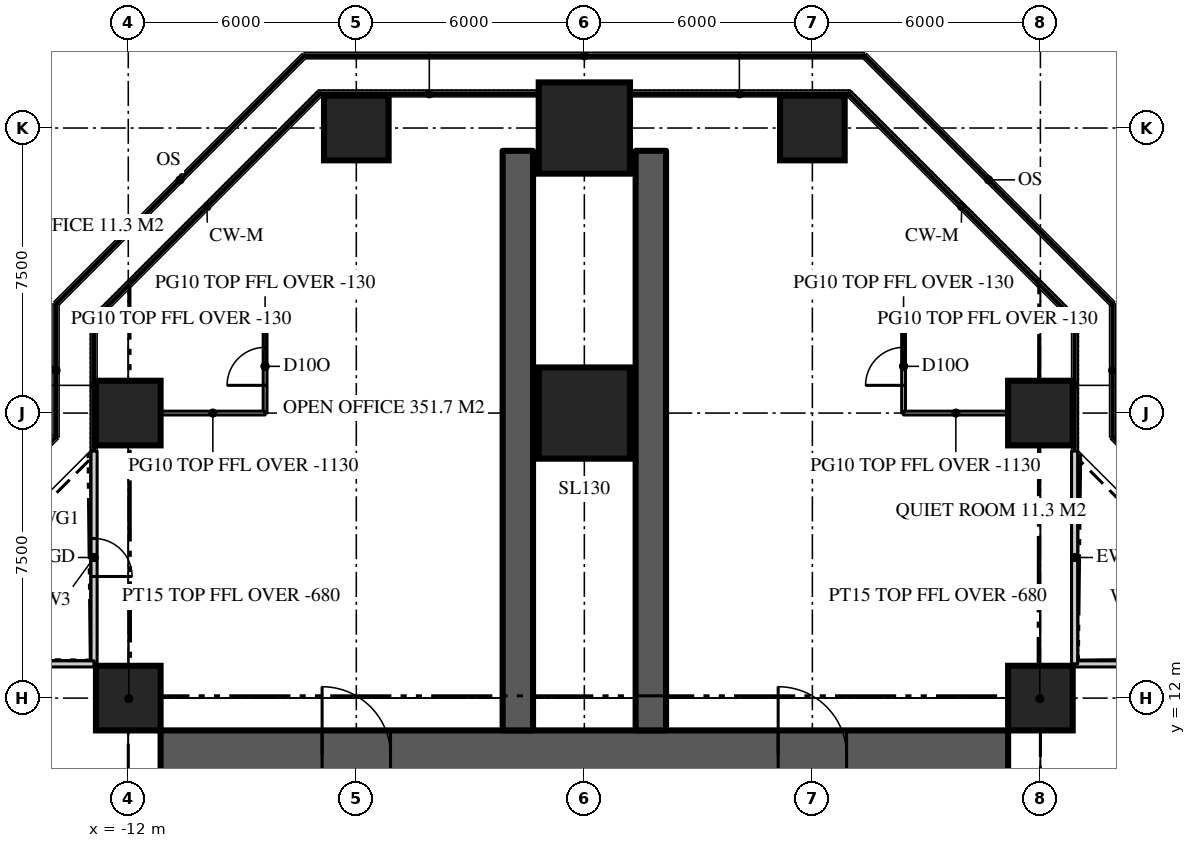
"""IFC4 building model, lengths in metres.
Left out: names, types, materials, properties, quantities, classifications, styles, units other than length and angle.
Written with IfcOpenShell. Run it as: python <this file> out.ifc"""

import sys

from ifc_helpers import new_model, si_unit, direction, frame, frame_2d, origin, origin_2d, place, context, subcontext, project, spatial, rectangle, extrude, element, fill, save


model = new_model("IFC4")
c1 = context("Model", 3, precision=1e-05, world=origin(), true_north=direction((0.0, 1.0)))
c2 = subcontext(c1, "Body", "Model", "MODEL_VIEW")
j1 = project(units=[si_unit("LENGTHUNIT", "METRE"), si_unit("PLANEANGLEUNIT", "RADIAN")], contexts=[c1])
p1 = place(None, origin())
s1 = spatial("IfcSite", under=j1, at=p1, CompositionType="ELEMENT")
p2 = place(p1, origin())
s2 = spatial("IfcBuilding", under=s1, at=p2, CompositionType="ELEMENT")
p3 = place(p2, frame((0.0, 0.0, 178.8)))
s3 = spatial("IfcBuildingStorey", under=s2, at=p3, CompositionType="ELEMENT", Elevation=178.8)
p4 = place(p3, frame((-11.15, 10.5, 0.0), z_axis=(0.0, 0.0, 1.0), x_axis=(1.0, 0.0, 0.0)))
e1 = element("IfcWall", 1, at=p4, inside=s3, PredefinedType="SHEAR", context=c2, shape_type="SweptSolid", body=[
    extrude(rectangle(XDim=22.3, YDim=1.3, at=frame_2d((11.15, 0.0))), origin(), (0.0, 0.0, 1.0), 3.9),
])
p5 = place(p4, frame((4.25, 0.0, 0.0)))
e2 = element("IfcOpeningElement", 2, at=p5, cuts=e1, PredefinedType="OPENING", context=c2, shape_type="SweptSolid", body=[
    extrude(rectangle(XDim=1.8, YDim=2.2, at=frame_2d((0.9, 1.1))), frame((0.0, 0.66, 0.0), z_axis=(0.0, -1.0, 0.0), x_axis=(1.0, 0.0, 0.0)), (0.0, 0.0, 1.0), 1.32),
])
p6 = place(p4, frame((16.25, 0.0, 0.0)))
e3 = element("IfcOpeningElement", 3, at=p6, cuts=e1, PredefinedType="OPENING", context=c2, shape_type="SweptSolid", body=[
    extrude(rectangle(XDim=1.8, YDim=2.2, at=frame_2d((0.9, 1.1))), frame((0.0, 0.66, 0.0), z_axis=(0.0, -1.0, 0.0), x_axis=(1.0, 0.0, 0.0)), (0.0, 0.0, 1.0), 1.32),
])
for number, where, z_axis, x_axis in (
    (4, (1.75, 11.15, 0.0), (0.0, 0.0, 1.0), (0.0, 1.0, 0.0)),
    (5, (-1.75, 11.15, 0.0), (0.0, 0.0, 1.0), (0.0, 1.0, 0.0)),
):
    element("IfcWall", number, at=place(p3, frame(where, z_axis=z_axis, x_axis=x_axis)), inside=s3, PredefinedType="SHEAR", context=c2, shape_type="SweptSolid", body=[
        extrude(rectangle(XDim=15.25, YDim=0.8, at=frame_2d((7.625, 0.0))), origin(), (0.0, 0.0, 1.0), 3.9),
    ])
for number, where, z_axis, x_axis in (
    (6, (-12.0, 12.0, 0.0), (0.0, 0.0, 1.0), (1.0, 0.0, 0.0)),
    (7, (12.0, 12.0, 0.0), (0.0, 0.0, 1.0), (1.0, 0.0, 0.0)),
    (8, (-12.0, 19.5, 0.0), (0.0, 0.0, 1.0), (1.0, 0.0, 0.0)),
):
    element("IfcColumn", number, at=place(p3, frame(where, z_axis=z_axis, x_axis=x_axis)), inside=s3, PredefinedType="COLUMN", context=c2, shape_type="SweptSolid", body=[
        extrude(rectangle(XDim=1.7, YDim=1.7, at=origin_2d()), origin(), (0.0, 0.0, 1.0), 3.9),
    ])
p7 = place(p3, frame((0.0, 19.5, 0.0), z_axis=(0.0, 0.0, 1.0), x_axis=(1.0, 0.0, 0.0)))
e9 = element("IfcColumn", 9, at=p7, inside=s3, PredefinedType="COLUMN", context=c2, shape_type="SweptSolid", body=[
    extrude(rectangle(XDim=2.4, YDim=2.4, at=origin_2d()), origin(), (0.0, 0.0, 1.0), 3.9),
])
for number, where, z_axis, x_axis in (
    (10, (12.0, 19.5, 0.0), (0.0, 0.0, 1.0), (1.0, 0.0, 0.0)),
    (11, (-6.0, 27.0, 0.0), (0.0, 0.0, 1.0), (1.0, 0.0, 0.0)),
):
    element("IfcColumn", number, at=place(p3, frame(where, z_axis=z_axis, x_axis=x_axis)), inside=s3, PredefinedType="COLUMN", context=c2, shape_type="SweptSolid", body=[
        extrude(rectangle(XDim=1.7, YDim=1.7, at=origin_2d()), origin(), (0.0, 0.0, 1.0), 3.9),
    ])
p8 = place(p3, frame((0.0, 27.0, 0.0), z_axis=(0.0, 0.0, 1.0), x_axis=(1.0, 0.0, 0.0)))
e12 = element("IfcColumn", 12, at=p8, inside=s3, PredefinedType="COLUMN", context=c2, shape_type="SweptSolid", body=[
    extrude(rectangle(XDim=2.4, YDim=2.4, at=origin_2d()), origin(), (0.0, 0.0, 1.0), 3.9),
])
p9 = place(p3, frame((6.0, 27.0, 0.0), z_axis=(0.0, 0.0, 1.0), x_axis=(1.0, 0.0, 0.0)))
e13 = element("IfcColumn", 13, at=p9, inside=s3, PredefinedType="COLUMN", context=c2, shape_type="SweptSolid", body=[
    extrude(rectangle(XDim=1.7, YDim=1.7, at=origin_2d()), origin(), (0.0, 0.0, 1.0), 3.9),
])
p10 = place(p3, frame((18.5, 12.9, 0.0), z_axis=(0.0, 0.0, 1.0), x_axis=(-1.0, 0.0, 0.0)))
e14 = element("IfcWall", 14, at=p10, inside=s3, PredefinedType="SOLIDWALL", context=c2, shape_type="SweptSolid", body=[
    extrude(rectangle(XDim=5.6, YDim=0.16, at=frame_2d((2.8, 0.0))), origin(), (0.0, 0.0, 1.0), 3.77),
])
p11 = place(p10, frame((2.3, 0.0, 0.0)))
e15 = element("IfcOpeningElement", 15, at=p11, cuts=e14, PredefinedType="OPENING", context=c2, shape_type="SweptSolid", body=[
    extrude(rectangle(XDim=1.0, YDim=2.2, at=frame_2d((0.5, 1.1))), frame((0.0, 0.09, 0.0), z_axis=(0.0, -1.0, 0.0), x_axis=(1.0, 0.0, 0.0)), (0.0, 0.0, 1.0), 0.18),
])
p12 = place(p3, frame((12.9, 12.9, 0.0), z_axis=(0.0, 0.0, 1.0), x_axis=(0.0, 1.0, 0.0)))
e16 = element("IfcWall", 16, at=p12, inside=s3, PredefinedType="SOLIDWALL", context=c2, shape_type="SweptSolid", body=[
    extrude(rectangle(XDim=5.6, YDim=0.16, at=frame_2d((2.8, 0.0))), origin(), (0.0, 0.0, 1.0), 3.77),
])
p13 = place(p3, frame((-12.9, 18.5, 0.0), z_axis=(0.0, 0.0, 1.0), x_axis=(0.0, -1.0, 0.0)))
e17 = element("IfcWall", 17, at=p13, inside=s3, PredefinedType="SOLIDWALL", context=c2, shape_type="SweptSolid", body=[
    extrude(rectangle(XDim=5.6, YDim=0.16, at=frame_2d((2.8, 0.0))), origin(), (0.0, 0.0, 1.0), 3.77),
])
p14 = place(p13, frame((2.3, 0.0, 0.0)))
e18 = element("IfcOpeningElement", 18, at=p14, cuts=e17, PredefinedType="OPENING", context=c2, shape_type="SweptSolid", body=[
    extrude(rectangle(XDim=1.0, YDim=2.2, at=frame_2d((0.5, 1.1))), frame((0.0, 0.09, 0.0), z_axis=(0.0, -1.0, 0.0), x_axis=(1.0, 0.0, 0.0)), (0.0, 0.0, 1.0), 0.18),
])
p15 = place(p3, frame((-12.9, 12.9, 0.0), z_axis=(0.0, 0.0, 1.0), x_axis=(-1.0, 0.0, 0.0)))
e19 = element("IfcWall", 19, at=p15, inside=s3, PredefinedType="SOLIDWALL", context=c2, shape_type="SweptSolid", body=[
    extrude(rectangle(XDim=5.6, YDim=0.16, at=frame_2d((2.8, 0.0))), origin(), (0.0, 0.0, 1.0), 3.77),
])
p16 = place(p3, frame((-8.4, 19.5, 0.0), z_axis=(0.0, 0.0, 1.0), x_axis=(0.0, 1.0, 0.0)))
e20 = element("IfcWall", 20, at=p16, inside=s3, PredefinedType="PARTITIONING", context=c2, shape_type="SweptSolid", body=[
    extrude(rectangle(XDim=2.459, YDim=0.1, at=frame_2d((1.229, 0.0))), origin(), (0.0, 0.0, 1.0), 3.77),
])
p17 = place(p16, frame((0.729, 0.0, 0.0)))
e21 = element("IfcOpeningElement", 21, at=p17, cuts=e20, PredefinedType="OPENING", context=c2, shape_type="SweptSolid", body=[
    extrude(rectangle(XDim=1.0, YDim=2.2, at=frame_2d((0.5, 1.1))), frame((0.0, 0.06, 0.0), z_axis=(0.0, -1.0, 0.0), x_axis=(1.0, 0.0, 0.0)), (0.0, 0.0, 1.0), 0.12),
])
p18 = place(p3, frame((-8.4, 19.5, 0.0), z_axis=(0.0, 0.0, 1.0), x_axis=(-1.0, 0.0, 0.0)))
e22 = element("IfcWall", 22, at=p18, inside=s3, PredefinedType="PARTITIONING", context=c2, shape_type="SweptSolid", body=[
    extrude(rectangle(XDim=2.75, YDim=0.1, at=frame_2d((1.375, 0.0))), origin(), (0.0, 0.0, 1.0), 2.77),
])
p19 = place(p3, frame((-8.4, 21.959, 0.0), z_axis=(0.0, 0.0, 1.0), x_axis=(-1.0, 0.0, 0.0)))
e23 = element("IfcWall", 23, at=p19, inside=s3, PredefinedType="PARTITIONING", context=c2, shape_type="SweptSolid", body=[
    extrude(rectangle(XDim=4.42, YDim=0.1, at=frame_2d((2.21, 0.0))), origin(), (0.0, 0.0, 1.0), 3.77),
])
p20 = place(p3, frame((8.4, 19.5, 0.0), z_axis=(0.0, 0.0, 1.0), x_axis=(0.0, 1.0, 0.0)))
e24 = element("IfcWall", 24, at=p20, inside=s3, PredefinedType="PARTITIONING", context=c2, shape_type="SweptSolid", body=[
    extrude(rectangle(XDim=2.459, YDim=0.1, at=frame_2d((1.229, 0.0))), origin(), (0.0, 0.0, 1.0), 3.77),
])
p21 = place(p20, frame((0.729, 0.0, 0.0)))
e25 = element("IfcOpeningElement", 25, at=p21, cuts=e24, PredefinedType="OPENING", context=c2, shape_type="SweptSolid", body=[
    extrude(rectangle(XDim=1.0, YDim=2.2, at=frame_2d((0.5, 1.1))), frame((0.0, 0.06, 0.0), z_axis=(0.0, -1.0, 0.0), x_axis=(1.0, 0.0, 0.0)), (0.0, 0.0, 1.0), 0.12),
])
p22 = place(p3, frame((8.4, 19.5, 0.0), z_axis=(0.0, 0.0, 1.0), x_axis=(1.0, 0.0, 0.0)))
e26 = element("IfcWall", 26, at=p22, inside=s3, PredefinedType="PARTITIONING", context=c2, shape_type="SweptSolid", body=[
    extrude(rectangle(XDim=2.75, YDim=0.1, at=frame_2d((1.375, 0.0))), origin(), (0.0, 0.0, 1.0), 2.77),
])
p23 = place(p3, frame((8.4, 21.959, 0.0), z_axis=(0.0, 0.0, 1.0), x_axis=(1.0, 0.0, 0.0)))
e27 = element("IfcWall", 27, at=p23, inside=s3, PredefinedType="PARTITIONING", context=c2, shape_type="SweptSolid", body=[
    extrude(rectangle(XDim=4.42, YDim=0.1, at=frame_2d((2.21, 0.0))), origin(), (0.0, 0.0, 1.0), 3.77),
])
for number, where, z_axis, x_axis in (
    (28, (11.15, 11.15, 0.0), (0.0, 0.0, 1.0), (0.707, 0.707, 0.0)),
    (29, (-11.15, 11.15, 0.0), (0.0, 0.0, 1.0), (-0.707, 0.707, 0.0)),
):
    element("IfcWall", number, at=place(p3, frame(where, z_axis=z_axis, x_axis=x_axis)), inside=s3, PredefinedType="PARTITIONING", context=c2, shape_type="SweptSolid", body=[
        extrude(rectangle(XDim=2.362, YDim=0.15, at=frame_2d((1.181, 0.0))), origin(), (0.0, 0.0, 1.0), 3.22),
    ])
p24 = place(p14, origin())
e30 = element("IfcDoor", 30, at=p24, inside=s3, OperationType="SINGLE_SWING_RIGHT", PredefinedType="DOOR", context=c2, shape_type="SweptSolid", body=[
    extrude(rectangle(XDim=1.0, YDim=2.2, at=frame_2d((0.5, 1.1))), frame((0.0, 0.025, 0.0), z_axis=(0.0, -1.0, 0.0), x_axis=(1.0, 0.0, 0.0)), (0.0, 0.0, 1.0), 0.05),
])
fill(e18, e30)
p25 = place(p5, origin())
e31 = element("IfcDoor", 31, at=p25, inside=s3, OperationType="DOUBLE_DOOR_DOUBLE_SWING", PredefinedType="DOOR", context=c2, shape_type="SweptSolid", body=[
    extrude(rectangle(XDim=1.8, YDim=2.2, at=frame_2d((0.9, 1.1))), frame((0.0, 0.025, 0.0), z_axis=(0.0, -1.0, 0.0), x_axis=(1.0, 0.0, 0.0)), (0.0, 0.0, 1.0), 0.05),
])
fill(e2, e31)
p26 = place(p6, origin())
e32 = element("IfcDoor", 32, at=p26, inside=s3, OperationType="DOUBLE_DOOR_DOUBLE_SWING", PredefinedType="DOOR", context=c2, shape_type="SweptSolid", body=[
    extrude(rectangle(XDim=1.8, YDim=2.2, at=frame_2d((0.9, 1.1))), frame((0.0, 0.025, 0.0), z_axis=(0.0, -1.0, 0.0), x_axis=(1.0, 0.0, 0.0)), (0.0, 0.0, 1.0), 0.05),
])
fill(e3, e32)
p27 = place(p17, origin())
e33 = element("IfcDoor", 33, at=p27, inside=s3, OperationType="SINGLE_SWING_LEFT", PredefinedType="DOOR", context=c2, shape_type="SweptSolid", body=[
    extrude(rectangle(XDim=1.0, YDim=2.2, at=frame_2d((0.5, 1.1))), frame((0.0, 0.025, 0.0), z_axis=(0.0, -1.0, 0.0), x_axis=(1.0, 0.0, 0.0)), (0.0, 0.0, 1.0), 0.05),
])
fill(e21, e33)
p28 = place(p21, origin())
e34 = element("IfcDoor", 34, at=p28, inside=s3, OperationType="SINGLE_SWING_LEFT", PredefinedType="DOOR", context=c2, shape_type="SweptSolid", body=[
    extrude(rectangle(XDim=1.0, YDim=2.2, at=frame_2d((0.5, 1.1))), frame((0.0, 0.025, 0.0), z_axis=(0.0, -1.0, 0.0), x_axis=(1.0, 0.0, 0.0)), (0.0, 0.0, 1.0), 0.05),
])
fill(e25, e34)
save(model, sys.argv[1])
